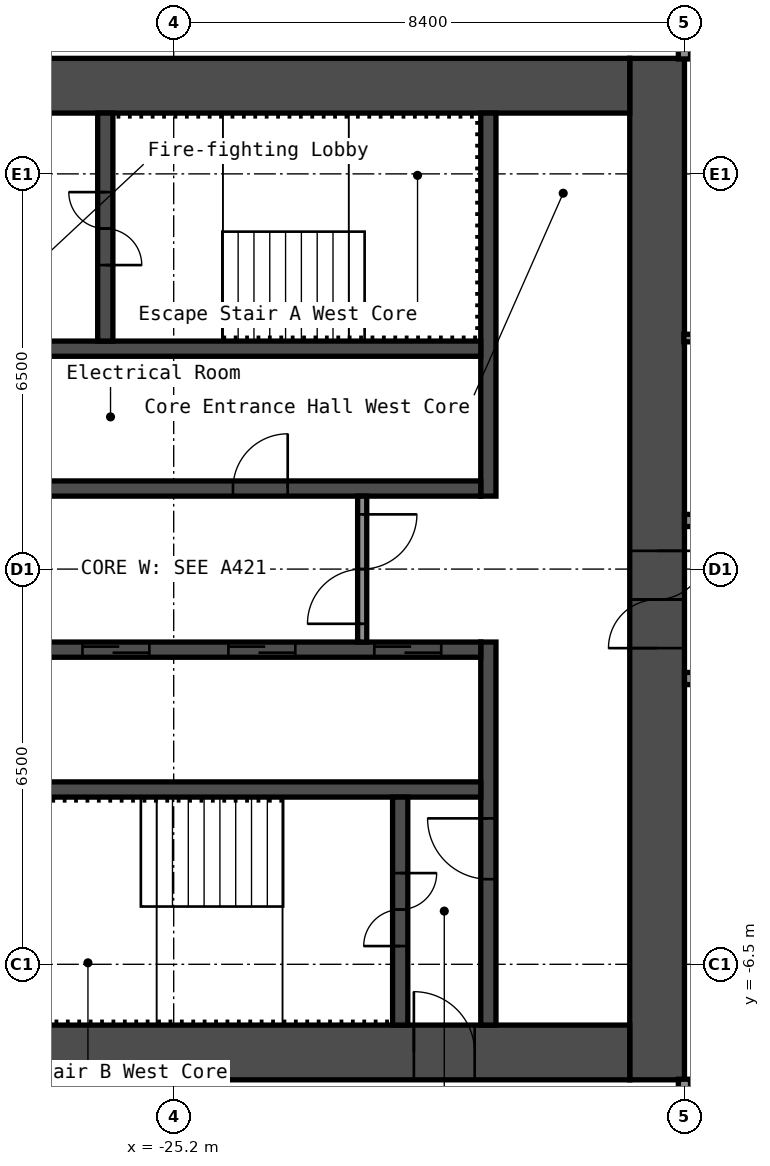
"""IFC4 building model, lengths in metres.
Left out: names, types, materials, properties, quantities, classifications, styles, units other than length and angle.
Written with IfcOpenShell. Run it as: python <this file> out.ifc"""

import sys

from ifc_helpers import new_model, si_unit, direction, frame, frame_2d, origin, place, context, subcontext, project, spatial, rectangle, extrude, element, fill, save


model = new_model("IFC4")
c1 = context("Model", 3, precision=1e-05, world=origin(), true_north=direction((0.0, 1.0)))
c2 = subcontext(c1, "Body", "Model", "MODEL_VIEW")
j1 = project(units=[si_unit("LENGTHUNIT", "METRE"), si_unit("PLANEANGLEUNIT", "RADIAN")], contexts=[c1])
p1 = place(None, origin())
s1 = spatial("IfcSite", under=j1, at=p1, CompositionType="ELEMENT")
p2 = place(p1, origin())
s2 = spatial("IfcBuilding", under=s1, at=p2, CompositionType="ELEMENT")
p3 = place(p2, frame((0.0, 0.0, 134.2)))
s3 = spatial("IfcBuildingStorey", under=s2, at=p3, CompositionType="ELEMENT", Elevation=134.2)
p4 = place(p3, frame((-17.25, -8.4, 0.0), z_axis=(0.0, 0.0, 1.0), x_axis=(0.0, 1.0, 0.0)))
e1 = element("IfcWall", 1, at=p4, inside=s3, PredefinedType="SHEAR", context=c2, shape_type="SweptSolid", body=[
    extrude(rectangle(XDim=16.8, YDim=0.9, at=frame_2d((8.4, 0.0))), origin(), (0.0, 0.0, 1.0), 2.75),
])
p5 = place(p4, frame((7.1, 0.0, 0.0)))
e2 = element("IfcOpeningElement", 2, at=p5, cuts=e1, PredefinedType="OPENING", context=c2, shape_type="SweptSolid", body=[
    extrude(rectangle(XDim=1.6, YDim=2.1, at=frame_2d((0.8, 1.05))), frame((0.0, 0.46, 0.0), z_axis=(0.0, -1.0, 0.0), x_axis=(1.0, 0.0, 0.0)), (0.0, 0.0, 1.0), 0.92),
])
p6 = place(p3, frame((-32.7, 7.95, 0.0), z_axis=(0.0, 0.0, 1.0), x_axis=(1.0, 0.0, 0.0)))
e3 = element("IfcWall", 3, at=p6, inside=s3, PredefinedType="SHEAR", context=c2, shape_type="SweptSolid", body=[
    extrude(rectangle(XDim=15.0, YDim=0.9, at=frame_2d((7.5, 0.0))), origin(), (0.0, 0.0, 1.0), 2.75),
])
p7 = place(p6, frame((3.4, 0.0, 0.0)))
e4 = element("IfcOpeningElement", 4, at=p7, cuts=e3, PredefinedType="OPENING", context=c2, shape_type="SweptSolid", body=[
    extrude(rectangle(XDim=1.2, YDim=2.1, at=frame_2d((0.6, 1.05))), frame((0.0, 0.46, 0.0), z_axis=(0.0, -1.0, 0.0), x_axis=(1.0, 0.0, 0.0)), (0.0, 0.0, 1.0), 0.92),
])
p8 = place(p6, frame((0.75, 0.0, 0.0)))
e5 = element("IfcOpeningElement", 5, at=p8, cuts=e3, PredefinedType="OPENING", context=c2, shape_type="SweptSolid", body=[
    extrude(rectangle(XDim=0.9, YDim=2.1, at=frame_2d((0.45, 1.05))), frame((0.0, 0.46, 0.0), z_axis=(0.0, -1.0, 0.0), x_axis=(1.0, 0.0, 0.0)), (0.0, 0.0, 1.0), 0.92),
])
p9 = place(p3, frame((-32.7, -7.95, 0.0), z_axis=(0.0, 0.0, 1.0), x_axis=(1.0, 0.0, 0.0)))
e6 = element("IfcWall", 6, at=p9, inside=s3, PredefinedType="SHEAR", context=c2, shape_type="SweptSolid", body=[
    extrude(rectangle(XDim=15.0, YDim=0.9, at=frame_2d((7.5, 0.0))), origin(), (0.0, 0.0, 1.0), 2.75),
])
p10 = place(p9, frame((11.45, 0.0, 0.0)))
e7 = element("IfcOpeningElement", 7, at=p10, cuts=e6, PredefinedType="OPENING", context=c2, shape_type="SweptSolid", body=[
    extrude(rectangle(XDim=1.0, YDim=2.1, at=frame_2d((0.5, 1.05))), frame((0.0, 0.46, 0.0), z_axis=(0.0, -1.0, 0.0), x_axis=(1.0, 0.0, 0.0)), (0.0, 0.0, 1.0), 0.92),
])
p11 = place(p3, frame((-20.025, 1.2, 0.0), z_axis=(0.0, 0.0, 1.0), x_axis=(0.0, 1.0, 0.0)))
e8 = element("IfcWall", 8, at=p11, inside=s3, PredefinedType="SHEAR", context=c2, shape_type="SweptSolid", body=[
    extrude(rectangle(XDim=6.3, YDim=0.25, at=frame_2d((3.15, 0.0))), origin(), (0.0, 0.0, 1.0), 2.75),
])
p12 = place(p3, frame((-20.025, -7.5, 0.0), z_axis=(0.0, 0.0, 1.0), x_axis=(0.0, 1.0, 0.0)))
e9 = element("IfcWall", 9, at=p12, inside=s3, PredefinedType="SHEAR", context=c2, shape_type="SweptSolid", body=[
    extrude(rectangle(XDim=6.3, YDim=0.25, at=frame_2d((3.15, 0.0))), origin(), (0.0, 0.0, 1.0), 2.75),
])
p13 = place(p12, frame((2.4, 0.0, 0.0)))
e10 = element("IfcOpeningElement", 10, at=p13, cuts=e9, PredefinedType="OPENING", context=c2, shape_type="SweptSolid", body=[
    extrude(rectangle(XDim=1.0, YDim=2.1, at=frame_2d((0.5, 1.05))), frame((0.0, 0.135, 0.0), z_axis=(0.0, -1.0, 0.0), x_axis=(1.0, 0.0, 0.0)), (0.0, 0.0, 1.0), 0.27),
])
p14 = place(p3, frame((-27.65, 1.325, 0.0), z_axis=(0.0, 0.0, 1.0), x_axis=(1.0, 0.0, 0.0)))
e11 = element("IfcWall", 11, at=p14, inside=s3, PredefinedType="SHEAR", context=c2, shape_type="SweptSolid", body=[
    extrude(rectangle(XDim=7.5, YDim=0.25, at=frame_2d((3.75, 0.0))), origin(), (0.0, 0.0, 1.0), 2.75),
])
p15 = place(p14, frame((3.425, 0.0, 0.0)))
e12 = element("IfcOpeningElement", 12, at=p15, cuts=e11, PredefinedType="OPENING", context=c2, shape_type="SweptSolid", body=[
    extrude(rectangle(XDim=0.9, YDim=2.1, at=frame_2d((0.45, 1.05))), frame((0.0, 0.135, 0.0), z_axis=(0.0, -1.0, 0.0), x_axis=(1.0, 0.0, 0.0)), (0.0, 0.0, 1.0), 0.27),
])
p16 = place(p3, frame((-27.65, 3.625, 0.0), z_axis=(0.0, 0.0, 1.0), x_axis=(1.0, 0.0, 0.0)))
e13 = element("IfcWall", 13, at=p16, inside=s3, PredefinedType="SHEAR", context=c2, shape_type="SweptSolid", body=[
    extrude(rectangle(XDim=7.5, YDim=0.25, at=frame_2d((3.75, 0.0))), origin(), (0.0, 0.0, 1.0), 2.75),
])
p17 = place(p3, frame((-26.325, 3.75, 0.0), z_axis=(0.0, 0.0, 1.0), x_axis=(0.0, 1.0, 0.0)))
e14 = element("IfcWall", 14, at=p17, inside=s3, PredefinedType="SHEAR", context=c2, shape_type="SweptSolid", body=[
    extrude(rectangle(XDim=3.75, YDim=0.25, at=frame_2d((1.875, 0.0))), origin(), (0.0, 0.0, 1.0), 2.75),
])
p18 = place(p17, frame((1.25, 0.0, 0.0)))
e15 = element("IfcOpeningElement", 15, at=p18, cuts=e14, PredefinedType="OPENING", context=c2, shape_type="SweptSolid", body=[
    extrude(rectangle(XDim=1.2, YDim=2.1, at=frame_2d((0.6, 1.05))), frame((0.0, 0.135, 0.0), z_axis=(0.0, -1.0, 0.0), x_axis=(1.0, 0.0, 0.0)), (0.0, 0.0, 1.0), 0.27),
])
p19 = place(p3, frame((-27.65, -1.325, 0.0), z_axis=(0.0, 0.0, 1.0), x_axis=(1.0, 0.0, 0.0)))
e16 = element("IfcWall", 16, at=p19, inside=s3, PredefinedType="SHEAR", context=c2, shape_type="SweptSolid", body=[
    extrude(rectangle(XDim=7.5, YDim=0.25, at=frame_2d((3.75, 0.0))), origin(), (0.0, 0.0, 1.0), 2.75),
])
p20 = place(p19, frame((5.75, 0.0, 0.0)))
e17 = element("IfcOpeningElement", 17, at=p20, cuts=e16, PredefinedType="OPENING", context=c2, shape_type="SweptSolid", body=[
    extrude(rectangle(XDim=1.1, YDim=2.1, at=frame_2d((0.55, 1.05))), frame((0.0, 0.135, 0.0), z_axis=(0.0, -1.0, 0.0), x_axis=(1.0, 0.0, 0.0)), (0.0, 0.0, 1.0), 0.27),
])
p21 = place(p19, frame((3.35, 0.0, 0.0)))
e18 = element("IfcOpeningElement", 18, at=p21, cuts=e16, PredefinedType="OPENING", context=c2, shape_type="SweptSolid", body=[
    extrude(rectangle(XDim=1.1, YDim=2.1, at=frame_2d((0.55, 1.05))), frame((0.0, 0.135, 0.0), z_axis=(0.0, -1.0, 0.0), x_axis=(1.0, 0.0, 0.0)), (0.0, 0.0, 1.0), 0.27),
])
p22 = place(p19, frame((0.95, 0.0, 0.0)))
e19 = element("IfcOpeningElement", 19, at=p22, cuts=e16, PredefinedType="OPENING", context=c2, shape_type="SweptSolid", body=[
    extrude(rectangle(XDim=1.1, YDim=2.1, at=frame_2d((0.55, 1.05))), frame((0.0, 0.135, 0.0), z_axis=(0.0, -1.0, 0.0), x_axis=(1.0, 0.0, 0.0)), (0.0, 0.0, 1.0), 0.27),
])
p23 = place(p3, frame((-27.65, -3.625, 0.0), z_axis=(0.0, 0.0, 1.0), x_axis=(1.0, 0.0, 0.0)))
e20 = element("IfcWall", 20, at=p23, inside=s3, PredefinedType="SHEAR", context=c2, shape_type="SweptSolid", body=[
    extrude(rectangle(XDim=7.5, YDim=0.25, at=frame_2d((3.75, 0.0))), origin(), (0.0, 0.0, 1.0), 2.75),
])
p24 = place(p3, frame((-21.475, -7.5, 0.0), z_axis=(0.0, 0.0, 1.0), x_axis=(0.0, 1.0, 0.0)))
e21 = element("IfcWall", 21, at=p24, inside=s3, PredefinedType="SHEAR", context=c2, shape_type="SweptSolid", body=[
    extrude(rectangle(XDim=3.75, YDim=0.25, at=frame_2d((1.875, 0.0))), origin(), (0.0, 0.0, 1.0), 2.75),
])
p25 = place(p24, frame((1.3, 0.0, 0.0)))
e22 = element("IfcOpeningElement", 22, at=p25, cuts=e21, PredefinedType="OPENING", context=c2, shape_type="SweptSolid", body=[
    extrude(rectangle(XDim=1.2, YDim=2.1, at=frame_2d((0.6, 1.05))), frame((0.0, 0.135, 0.0), z_axis=(0.0, -1.0, 0.0), x_axis=(1.0, 0.0, 0.0)), (0.0, 0.0, 1.0), 0.27),
])
p26 = place(p3, frame((-22.1, -1.2, 0.0), z_axis=(0.0, 0.0, 1.0), x_axis=(0.0, 1.0, 0.0)))
e23 = element("IfcWall", 23, at=p26, inside=s3, PredefinedType="PARTITIONING", context=c2, shape_type="SweptSolid", body=[
    extrude(rectangle(XDim=2.4, YDim=0.15, at=frame_2d((1.2, 0.0))), origin(), (0.0, 0.0, 1.0), 2.75),
])
p27 = place(p26, frame((0.3, 0.0, 0.0)))
e24 = element("IfcOpeningElement", 24, at=p27, cuts=e23, PredefinedType="OPENING", context=c2, shape_type="SweptSolid", body=[
    extrude(rectangle(XDim=1.8, YDim=2.1, at=frame_2d((0.9, 1.05))), frame((0.0, 0.085, 0.0), z_axis=(0.0, -1.0, 0.0), x_axis=(1.0, 0.0, 0.0)), (0.0, 0.0, 1.0), 0.17),
])
p28 = place(p3, frame((-16.8, -1.8, 0.0), z_axis=(0.0, 0.0, 1.0), x_axis=(1.0, 0.0, 0.0)))
e25 = element("IfcWall", 25, at=p28, inside=s3, PredefinedType="PARTITIONING", context=c2, shape_type="SweptSolid", body=[
    extrude(rectangle(XDim=33.6, YDim=0.2, at=frame_2d((16.8, 0.0))), origin(), (0.0, 0.0, 1.0), 2.75),
])
p29 = place(p28, frame((1.9, 0.0, 0.0)))
e26 = element("IfcOpeningElement", 26, at=p29, cuts=e25, PredefinedType="OPENING", context=c2, shape_type="SweptSolid", body=[
    extrude(rectangle(XDim=1.0, YDim=2.1, at=frame_2d((0.5, 1.05))), frame((0.0, 0.11, 0.0), z_axis=(0.0, -1.0, 0.0), x_axis=(1.0, 0.0, 0.0)), (0.0, 0.0, 1.0), 0.22),
])
p30 = place(p28, frame((10.3, 0.0, 0.0)))
e27 = element("IfcOpeningElement", 27, at=p30, cuts=e25, PredefinedType="OPENING", context=c2, shape_type="SweptSolid", body=[
    extrude(rectangle(XDim=1.0, YDim=2.1, at=frame_2d((0.5, 1.05))), frame((0.0, 0.11, 0.0), z_axis=(0.0, -1.0, 0.0), x_axis=(1.0, 0.0, 0.0)), (0.0, 0.0, 1.0), 0.22),
])
p31 = place(p28, frame((19.04, 0.0, 0.0)))
e28 = element("IfcOpeningElement", 28, at=p31, cuts=e25, PredefinedType="OPENING", context=c2, shape_type="SweptSolid", body=[
    extrude(rectangle(XDim=0.9, YDim=2.1, at=frame_2d((0.45, 1.05))), frame((0.0, 0.11, 0.0), z_axis=(0.0, -1.0, 0.0), x_axis=(1.0, 0.0, 0.0)), (0.0, 0.0, 1.0), 0.22),
])
p32 = place(p28, frame((23.24, 0.0, 0.0)))
e29 = element("IfcOpeningElement", 29, at=p32, cuts=e25, PredefinedType="OPENING", context=c2, shape_type="SweptSolid", body=[
    extrude(rectangle(XDim=0.9, YDim=2.1, at=frame_2d((0.45, 1.05))), frame((0.0, 0.11, 0.0), z_axis=(0.0, -1.0, 0.0), x_axis=(1.0, 0.0, 0.0)), (0.0, 0.0, 1.0), 0.22),
])
p33 = place(p28, frame((28.05, 0.0, 0.0)))
e30 = element("IfcOpeningElement", 30, at=p33, cuts=e25, PredefinedType="OPENING", context=c2, shape_type="SweptSolid", body=[
    extrude(rectangle(XDim=1.0, YDim=2.1, at=frame_2d((0.5, 1.05))), frame((0.0, 0.11, 0.0), z_axis=(0.0, -1.0, 0.0), x_axis=(1.0, 0.0, 0.0)), (0.0, 0.0, 1.0), 0.22),
])
p34 = place(p28, frame((29.75, 0.0, 0.0)))
e31 = element("IfcOpeningElement", 31, at=p34, cuts=e25, PredefinedType="OPENING", context=c2, shape_type="SweptSolid", body=[
    extrude(rectangle(XDim=1.0, YDim=2.1, at=frame_2d((0.5, 1.05))), frame((0.0, 0.11, 0.0), z_axis=(0.0, -1.0, 0.0), x_axis=(1.0, 0.0, 0.0)), (0.0, 0.0, 1.0), 0.22),
])
p35 = place(p3, frame((-16.8, 0.8, 0.0), z_axis=(0.0, 0.0, 1.0), x_axis=(1.0, 0.0, 0.0)))
e32 = element("IfcWall", 32, at=p35, inside=s3, PredefinedType="PARTITIONING", context=c2, shape_type="SweptSolid", body=[
    extrude(rectangle(XDim=33.6, YDim=0.2, at=frame_2d((16.8, 0.0))), origin(), (0.0, 0.0, 1.0), 2.75),
])
p36 = place(p35, frame((2.85, 0.0, 0.0)))
e33 = element("IfcOpeningElement", 33, at=p36, cuts=e32, PredefinedType="OPENING", context=c2, shape_type="SweptSolid", body=[
    extrude(rectangle(XDim=1.0, YDim=2.1, at=frame_2d((0.5, 1.05))), frame((0.0, 0.11, 0.0), z_axis=(0.0, -1.0, 0.0), x_axis=(1.0, 0.0, 0.0)), (0.0, 0.0, 1.0), 0.22),
])
p37 = place(p35, frame((4.55, 0.0, 0.0)))
e34 = element("IfcOpeningElement", 34, at=p37, cuts=e32, PredefinedType="OPENING", context=c2, shape_type="SweptSolid", body=[
    extrude(rectangle(XDim=1.0, YDim=2.1, at=frame_2d((0.5, 1.05))), frame((0.0, 0.11, 0.0), z_axis=(0.0, -1.0, 0.0), x_axis=(1.0, 0.0, 0.0)), (0.0, 0.0, 1.0), 0.22),
])
p38 = place(p35, frame((12.1, 0.0, 0.0)))
e35 = element("IfcOpeningElement", 35, at=p38, cuts=e32, PredefinedType="OPENING", context=c2, shape_type="SweptSolid", body=[
    extrude(rectangle(XDim=1.0, YDim=2.1, at=frame_2d((0.5, 1.05))), frame((0.0, 0.11, 0.0), z_axis=(0.0, -1.0, 0.0), x_axis=(1.0, 0.0, 0.0)), (0.0, 0.0, 1.0), 0.22),
])
p39 = place(p35, frame((19.65, 0.0, 0.0)))
e36 = element("IfcOpeningElement", 36, at=p39, cuts=e32, PredefinedType="OPENING", context=c2, shape_type="SweptSolid", body=[
    extrude(rectangle(XDim=1.0, YDim=2.1, at=frame_2d((0.5, 1.05))), frame((0.0, 0.11, 0.0), z_axis=(0.0, -1.0, 0.0), x_axis=(1.0, 0.0, 0.0)), (0.0, 0.0, 1.0), 0.22),
])
p40 = place(p35, frame((21.35, 0.0, 0.0)))
e37 = element("IfcOpeningElement", 37, at=p40, cuts=e32, PredefinedType="OPENING", context=c2, shape_type="SweptSolid", body=[
    extrude(rectangle(XDim=1.0, YDim=2.1, at=frame_2d((0.5, 1.05))), frame((0.0, 0.11, 0.0), z_axis=(0.0, -1.0, 0.0), x_axis=(1.0, 0.0, 0.0)), (0.0, 0.0, 1.0), 0.22),
])
p41 = place(p35, frame((28.05, 0.0, 0.0)))
e38 = element("IfcOpeningElement", 38, at=p41, cuts=e32, PredefinedType="OPENING", context=c2, shape_type="SweptSolid", body=[
    extrude(rectangle(XDim=1.0, YDim=2.1, at=frame_2d((0.5, 1.05))), frame((0.0, 0.11, 0.0), z_axis=(0.0, -1.0, 0.0), x_axis=(1.0, 0.0, 0.0)), (0.0, 0.0, 1.0), 0.22),
])
p42 = place(p35, frame((29.75, 0.0, 0.0)))
e39 = element("IfcOpeningElement", 39, at=p42, cuts=e32, PredefinedType="OPENING", context=c2, shape_type="SweptSolid", body=[
    extrude(rectangle(XDim=1.0, YDim=2.1, at=frame_2d((0.5, 1.05))), frame((0.0, 0.11, 0.0), z_axis=(0.0, -1.0, 0.0), x_axis=(1.0, 0.0, 0.0)), (0.0, 0.0, 1.0), 0.22),
])
p43 = place(p3, frame((-16.81, 3.8, 0.0), z_axis=(0.0, 0.0, 1.0), x_axis=(1.0, 0.0, 0.0)))
e40 = element("IfcWall", 40, at=p43, inside=s3, PredefinedType="PARTITIONING", context=c2, shape_type="SweptSolid", body=[
    extrude(rectangle(XDim=2.448, YDim=0.125, at=frame_2d((1.224, 0.0))), origin(), (0.0, 0.0, 1.0), 2.75),
])
p44 = place(p3, frame((-16.8, -19.3, 0.0), z_axis=(0.0, 0.0, 1.0), x_axis=(0.0, 1.0, 0.0)))
e41 = element("IfcWall", 41, at=p44, inside=s3, PredefinedType="PARTITIONING", context=c2, shape_type="SweptSolid", body=[
    extrude(rectangle(XDim=10.91, YDim=0.2, at=frame_2d((5.455, 0.0))), origin(), (0.0, 0.0, 1.0), 2.75),
])
p45 = place(p3, frame((-16.8, 8.39, 0.0), z_axis=(0.0, 0.0, 1.0), x_axis=(0.0, 1.0, 0.0)))
e42 = element("IfcWall", 42, at=p45, inside=s3, PredefinedType="PARTITIONING", context=c2, shape_type="SweptSolid", body=[
    extrude(rectangle(XDim=9.91, YDim=0.2, at=frame_2d((4.955, 0.0))), origin(), (0.0, 0.0, 1.0), 2.75),
])
p46 = place(p5, origin())
e43 = element("IfcDoor", 43, at=p46, inside=s3, OperationType="DOUBLE_DOOR_SINGLE_SWING", PredefinedType="DOOR", context=c2, shape_type="SweptSolid", body=[
    extrude(rectangle(XDim=1.6, YDim=2.1, at=frame_2d((0.8, 1.05))), frame((0.0, 0.025, 0.0), z_axis=(0.0, -1.0, 0.0), x_axis=(1.0, 0.0, 0.0)), (0.0, 0.0, 1.0), 0.05),
])
fill(e2, e43)
p47 = place(p10, origin())
e44 = element("IfcDoor", 44, at=p47, inside=s3, OperationType="SINGLE_SWING_RIGHT", PredefinedType="DOOR", context=c2, shape_type="SweptSolid", body=[
    extrude(rectangle(XDim=1.0, YDim=2.1, at=frame_2d((0.5, 1.05))), frame((0.0, 0.025, 0.0), z_axis=(0.0, -1.0, 0.0), x_axis=(1.0, 0.0, 0.0)), (0.0, 0.0, 1.0), 0.05),
])
fill(e7, e44)
p48 = place(p18, origin())
e45 = element("IfcDoor", 45, at=p48, inside=s3, OperationType="DOUBLE_DOOR_SINGLE_SWING", PredefinedType="DOOR", context=c2, shape_type="SweptSolid", body=[
    extrude(rectangle(XDim=1.2, YDim=2.1, at=frame_2d((0.6, 1.05))), frame((0.0, 0.025, 0.0), z_axis=(0.0, -1.0, 0.0), x_axis=(1.0, 0.0, 0.0)), (0.0, 0.0, 1.0), 0.05),
])
fill(e15, e45)
p49 = place(p25, origin())
e46 = element("IfcDoor", 46, at=p49, inside=s3, OperationType="DOUBLE_DOOR_SINGLE_SWING", PredefinedType="DOOR", context=c2, shape_type="SweptSolid", body=[
    extrude(rectangle(XDim=1.2, YDim=2.1, at=frame_2d((0.6, 1.05))), frame((0.0, 0.025, 0.0), z_axis=(0.0, -1.0, 0.0), x_axis=(1.0, 0.0, 0.0)), (0.0, 0.0, 1.0), 0.05),
])
fill(e22, e46)
p50 = place(p13, origin())
e47 = element("IfcDoor", 47, at=p50, inside=s3, OperationType="SINGLE_SWING_LEFT", PredefinedType="DOOR", context=c2, shape_type="SweptSolid", body=[
    extrude(rectangle(XDim=1.0, YDim=2.1, at=frame_2d((0.5, 1.05))), frame((0.0, 0.025, 0.0), z_axis=(0.0, -1.0, 0.0), x_axis=(1.0, 0.0, 0.0)), (0.0, 0.0, 1.0), 0.05),
])
fill(e10, e47)
p51 = place(p27, origin())
e48 = element("IfcDoor", 48, at=p51, inside=s3, OperationType="DOUBLE_DOOR_SINGLE_SWING", PredefinedType="DOOR", context=c2, shape_type="SweptSolid", body=[
    extrude(rectangle(XDim=1.8, YDim=2.1, at=frame_2d((0.9, 1.05))), frame((0.0, 0.025, 0.0), z_axis=(0.0, -1.0, 0.0), x_axis=(1.0, 0.0, 0.0)), (0.0, 0.0, 1.0), 0.05),
])
fill(e24, e48)
p52 = place(p15, origin())
e49 = element("IfcDoor", 49, at=p52, inside=s3, OperationType="SINGLE_SWING_LEFT", PredefinedType="DOOR", context=c2, shape_type="SweptSolid", body=[
    extrude(rectangle(XDim=0.9, YDim=2.1, at=frame_2d((0.45, 1.05))), frame((0.0, 0.025, 0.0), z_axis=(0.0, -1.0, 0.0), x_axis=(1.0, 0.0, 0.0)), (0.0, 0.0, 1.0), 0.05),
])
fill(e12, e49)
p53 = place(p20, origin())
e50 = element("IfcDoor", 50, at=p53, inside=s3, OperationType="DOUBLE_DOOR_SLIDING", PredefinedType="DOOR", context=c2, shape_type="SweptSolid", body=[
    extrude(rectangle(XDim=1.1, YDim=2.1, at=frame_2d((0.55, 1.05))), frame((0.0, 0.025, 0.0), z_axis=(0.0, -1.0, 0.0), x_axis=(1.0, 0.0, 0.0)), (0.0, 0.0, 1.0), 0.05),
])
fill(e17, e50)
p54 = place(p21, origin())
e51 = element("IfcDoor", 51, at=p54, inside=s3, OperationType="DOUBLE_DOOR_SLIDING", PredefinedType="DOOR", context=c2, shape_type="SweptSolid", body=[
    extrude(rectangle(XDim=1.1, YDim=2.1, at=frame_2d((0.55, 1.05))), frame((0.0, 0.025, 0.0), z_axis=(0.0, -1.0, 0.0), x_axis=(1.0, 0.0, 0.0)), (0.0, 0.0, 1.0), 0.05),
])
fill(e18, e51)
p55 = place(p22, origin())
e52 = element("IfcDoor", 52, at=p55, inside=s3, OperationType="DOUBLE_DOOR_SLIDING", PredefinedType="DOOR", context=c2, shape_type="SweptSolid", body=[
    extrude(rectangle(XDim=1.1, YDim=2.1, at=frame_2d((0.55, 1.05))), frame((0.0, 0.025, 0.0), z_axis=(0.0, -1.0, 0.0), x_axis=(1.0, 0.0, 0.0)), (0.0, 0.0, 1.0), 0.05),
])
fill(e19, e52)
save(model, sys.argv[1])
